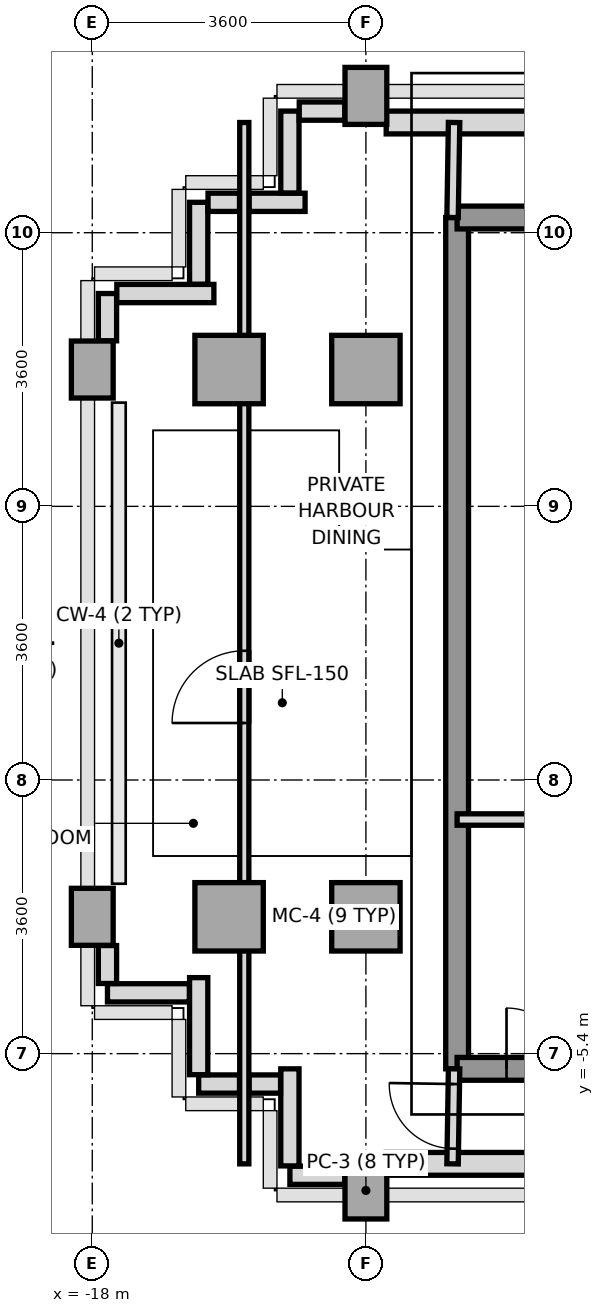
"""IFC4 building model, lengths in metres.
Left out: names, types, materials, properties, quantities, classifications, styles, units other than length and angle.
Written with IfcOpenShell. Run it as: python <this file> out.ifc"""

import sys

from ifc_helpers import new_model, si_unit, direction, frame, frame_2d, origin, origin_2d, place, context, subcontext, project, spatial, rectangle, extrude, source, transform, mapped, element, fill, save


model = new_model("IFC4")
c1 = context("Model", 3, precision=1e-05, world=origin(), true_north=direction((0.0, 1.0)))
c2 = subcontext(c1, "Body", "Model", "MODEL_VIEW")
j1 = project(units=[si_unit("LENGTHUNIT", "METRE"), si_unit("PLANEANGLEUNIT", "RADIAN")], contexts=[c1])
p1 = place(None, origin())
s1 = spatial("IfcSite", under=j1, at=p1, CompositionType="ELEMENT")
p2 = place(p1, origin())
s2 = spatial("IfcBuilding", under=s1, at=p2, CompositionType="ELEMENT")
p3 = place(p2, frame((0.0, 0.0, 242.8)))
s3 = spatial("IfcBuildingStorey", under=s2, at=p3, CompositionType="ELEMENT", Elevation=242.8)
m1 = source(origin(), c2, "Body", "SweptSolid", [
    extrude(rectangle(XDim=0.55, YDim=0.75, at=origin_2d()), origin(), (0.0, 0.0, 1.0), 3.01),
])
for number, where, z_axis, x_axis in (
    (1, (-18.0, -3.6, 0.0), (0.0, 0.0, 1.0), (1.0, 0.0, 0.0)),
    (2, (-18.0, 3.6, 0.0), (0.0, 0.0, 1.0), (1.0, 0.0, 0.0)),
):
    element("IfcColumn", number, at=place(p3, frame(where, z_axis=z_axis, x_axis=x_axis)), inside=s3, PredefinedType="COLUMN", context=c2, shape_type="MappedRepresentation", body=[
        mapped(m1, transform((0.0, 0.0, 0.0), x_axis=(1.0, 0.0, 0.0), y_axis=(0.0, 1.0, 0.0), z_axis=(0.0, 0.0, 1.0), scale=1.0)),
    ])
m2 = source(origin(), c2, "Body", "SweptSolid", [
    extrude(rectangle(XDim=0.9, YDim=0.9, at=origin_2d()), origin(), (0.0, 0.0, 1.0), 3.01),
])
for number, where, z_axis, x_axis in (
    (3, (-16.2, -3.6, 0.0), (0.0, 0.0, 1.0), (1.0, 0.0, 0.0)),
    (4, (-16.2, 3.6, 0.0), (0.0, 0.0, 1.0), (1.0, 0.0, 0.0)),
):
    element("IfcColumn", number, at=place(p3, frame(where, z_axis=z_axis, x_axis=x_axis)), inside=s3, PredefinedType="COLUMN", context=c2, shape_type="MappedRepresentation", body=[
        mapped(m2, transform((0.0, 0.0, 0.0), x_axis=(1.0, 0.0, 0.0), y_axis=(0.0, 1.0, 0.0), z_axis=(0.0, 0.0, 1.0), scale=1.0)),
    ])
p4 = place(p3, frame((-14.4, -7.2, 0.0), z_axis=(0.0, 0.0, 1.0), x_axis=(1.0, 0.0, 0.0)))
e5 = element("IfcColumn", 5, at=p4, inside=s3, PredefinedType="COLUMN", context=c2, shape_type="MappedRepresentation", body=[
    mapped(m1, transform((0.0, 0.0, 0.0), x_axis=(1.0, 0.0, 0.0), y_axis=(0.0, 1.0, 0.0), z_axis=(0.0, 0.0, 1.0), scale=1.0)),
])
for number, where, z_axis, x_axis in (
    (6, (-14.4, -3.6, 0.0), (0.0, 0.0, 1.0), (1.0, 0.0, 0.0)),
    (7, (-14.4, 3.6, 0.0), (0.0, 0.0, 1.0), (1.0, 0.0, 0.0)),
):
    element("IfcColumn", number, at=place(p3, frame(where, z_axis=z_axis, x_axis=x_axis)), inside=s3, PredefinedType="COLUMN", context=c2, shape_type="MappedRepresentation", body=[
        mapped(m2, transform((0.0, 0.0, 0.0), x_axis=(1.0, 0.0, 0.0), y_axis=(0.0, 1.0, 0.0), z_axis=(0.0, 0.0, 1.0), scale=1.0)),
    ])
p5 = place(p3, frame((-14.4, 7.2, 0.0), z_axis=(0.0, 0.0, 1.0), x_axis=(1.0, 0.0, 0.0)))
e8 = element("IfcColumn", 8, at=p5, inside=s3, PredefinedType="COLUMN", context=c2, shape_type="MappedRepresentation", body=[
    mapped(m1, transform((0.0, 0.0, 0.0), x_axis=(1.0, 0.0, 0.0), y_axis=(0.0, 1.0, 0.0), z_axis=(0.0, 0.0, 1.0), scale=1.0)),
])
p6 = place(p3, frame((-14.133, 6.85, 0.0), z_axis=(0.0, 0.0, 1.0), x_axis=(1.0, 0.0, 0.0)))
e9 = element("IfcWall", 9, at=p6, inside=s3, PredefinedType="SOLIDWALL", context=c2, shape_type="SweptSolid", body=[
    extrude(rectangle(XDim=2.685, YDim=0.3, at=frame_2d((1.343, 0.0))), origin(), (0.0, 0.0, 1.0), 2.57),
])
p7 = place(p3, frame((-14.133, -6.85, 0.0), z_axis=(0.0, 0.0, 1.0), x_axis=(1.0, 0.0, 0.0)))
e10 = element("IfcWall", 10, at=p7, inside=s3, PredefinedType="SOLIDWALL", context=c2, shape_type="SweptSolid", body=[
    extrude(rectangle(XDim=2.383, YDim=0.3, at=frame_2d((1.191, 0.0))), origin(), (0.0, 0.0, 1.0), 2.57),
])
p8 = place(p3, frame((-14.678, -7.0, 0.0), z_axis=(0.0, 0.0, 1.0), x_axis=(-1.0, 0.0, 0.0)))
e11 = element("IfcWall", 11, at=p8, inside=s3, PredefinedType="PARAPET", context=c2, shape_type="SweptSolid", body=[
    extrude(rectangle(XDim=0.722, YDim=0.24, at=frame_2d((0.361, 0.0))), origin(), (0.0, 0.0, 1.0), 1.15),
])
p9 = place(p3, frame((-15.4, -6.877, 0.0), z_axis=(0.0, 0.0, 1.0), x_axis=(0.0, 1.0, 0.0)))
e12 = element("IfcWall", 12, at=p9, inside=s3, PredefinedType="PARAPET", context=c2, shape_type="SweptSolid", body=[
    extrude(rectangle(XDim=1.277, YDim=0.24, at=frame_2d((0.638, 0.0))), origin(), (0.0, 0.0, 1.0), 1.15),
])
p10 = place(p3, frame((-15.523, -5.8, 0.0), z_axis=(0.0, 0.0, 1.0), x_axis=(-1.0, 0.0, 0.0)))
e13 = element("IfcWall", 13, at=p10, inside=s3, PredefinedType="PARAPET", context=c2, shape_type="SweptSolid", body=[
    extrude(rectangle(XDim=0.414, YDim=0.24, at=frame_2d((0.207, 0.0))), origin(), (0.0, 0.0, 1.0), 1.15),
])
p11 = place(p3, frame((-16.063, -5.8, 0.0), z_axis=(0.0, 0.0, 1.0), x_axis=(-1.0, 0.0, 0.0)))
e14 = element("IfcWall", 14, at=p11, inside=s3, PredefinedType="PARAPET", context=c2, shape_type="SweptSolid", body=[
    extrude(rectangle(XDim=0.537, YDim=0.24, at=frame_2d((0.269, 0.0))), origin(), (0.0, 0.0, 1.0), 1.15),
])
p12 = place(p3, frame((-16.6, -5.677, 0.0), z_axis=(0.0, 0.0, 1.0), x_axis=(0.0, 1.0, 0.0)))
e15 = element("IfcWall", 15, at=p12, inside=s3, PredefinedType="PARAPET", context=c2, shape_type="SweptSolid", body=[
    extrude(rectangle(XDim=1.277, YDim=0.24, at=frame_2d((0.639, 0.0))), origin(), (0.0, 0.0, 1.0), 1.15),
])
p13 = place(p3, frame((-16.723, -4.6, 0.0), z_axis=(0.0, 0.0, 1.0), x_axis=(-1.0, 0.0, 0.0)))
e16 = element("IfcWall", 16, at=p13, inside=s3, PredefinedType="PARAPET", context=c2, shape_type="SweptSolid", body=[
    extrude(rectangle(XDim=1.077, YDim=0.24, at=frame_2d((0.539, 0.0))), origin(), (0.0, 0.0, 1.0), 1.15),
])
p14 = place(p3, frame((-17.8, -4.477, 0.0), z_axis=(0.0, 0.0, 1.0), x_axis=(0.0, 1.0, 0.0)))
e17 = element("IfcWall", 17, at=p14, inside=s3, PredefinedType="PARAPET", context=c2, shape_type="SweptSolid", body=[
    extrude(rectangle(XDim=0.499, YDim=0.24, at=frame_2d((0.25, 0.0))), origin(), (0.0, 0.0, 1.0), 1.15),
])
p15 = place(p3, frame((-17.8, 3.978, 0.0), z_axis=(0.0, 0.0, 1.0), x_axis=(0.0, 1.0, 0.0)))
e18 = element("IfcWall", 18, at=p15, inside=s3, PredefinedType="PARAPET", context=c2, shape_type="SweptSolid", body=[
    extrude(rectangle(XDim=0.622, YDim=0.24, at=frame_2d((0.311, 0.0))), origin(), (0.0, 0.0, 1.0), 1.15),
])
p16 = place(p3, frame((-17.677, 4.6, 0.0), z_axis=(0.0, 0.0, 1.0), x_axis=(1.0, 0.0, 0.0)))
e19 = element("IfcWall", 19, at=p16, inside=s3, PredefinedType="PARAPET", context=c2, shape_type="SweptSolid", body=[
    extrude(rectangle(XDim=1.277, YDim=0.24, at=frame_2d((0.639, 0.0))), origin(), (0.0, 0.0, 1.0), 1.15),
])
p17 = place(p3, frame((-16.6, 4.723, 0.0), z_axis=(0.0, 0.0, 1.0), x_axis=(0.0, 1.0, 0.0)))
e20 = element("IfcWall", 20, at=p17, inside=s3, PredefinedType="PARAPET", context=c2, shape_type="SweptSolid", body=[
    extrude(rectangle(XDim=1.077, YDim=0.24, at=frame_2d((0.539, 0.0))), origin(), (0.0, 0.0, 1.0), 1.15),
])
p18 = place(p3, frame((-16.477, 5.8, 0.0), z_axis=(0.0, 0.0, 1.0), x_axis=(1.0, 0.0, 0.0)))
e21 = element("IfcWall", 21, at=p18, inside=s3, PredefinedType="PARAPET", context=c2, shape_type="SweptSolid", body=[
    extrude(rectangle(XDim=0.414, YDim=0.24, at=frame_2d((0.207, 0.0))), origin(), (0.0, 0.0, 1.0), 1.15),
])
p19 = place(p3, frame((-15.937, 5.8, 0.0), z_axis=(0.0, 0.0, 1.0), x_axis=(1.0, 0.0, 0.0)))
e22 = element("IfcWall", 22, at=p19, inside=s3, PredefinedType="PARAPET", context=c2, shape_type="SweptSolid", body=[
    extrude(rectangle(XDim=0.737, YDim=0.24, at=frame_2d((0.369, 0.0))), origin(), (0.0, 0.0, 1.0), 1.15),
])
p20 = place(p3, frame((-15.4, 5.923, 0.0), z_axis=(0.0, 0.0, 1.0), x_axis=(0.0, 1.0, 0.0)))
e23 = element("IfcWall", 23, at=p20, inside=s3, PredefinedType="PARAPET", context=c2, shape_type="SweptSolid", body=[
    extrude(rectangle(XDim=1.077, YDim=0.24, at=frame_2d((0.539, 0.0))), origin(), (0.0, 0.0, 1.0), 1.15),
])
p21 = place(p3, frame((-15.277, 7.0, 0.0), z_axis=(0.0, 0.0, 1.0), x_axis=(1.0, 0.0, 0.0)))
e24 = element("IfcWall", 24, at=p21, inside=s3, PredefinedType="PARAPET", context=c2, shape_type="SweptSolid", body=[
    extrude(rectangle(XDim=0.599, YDim=0.24, at=frame_2d((0.3, 0.0))), origin(), (0.0, 0.0, 1.0), 1.15),
])
p22 = place(p3, frame((-13.2, -5.6, 0.0), z_axis=(0.0, 0.0, 1.0), x_axis=(0.0, 1.0, 0.0)))
e25 = element("IfcWall", 25, at=p22, inside=s3, PredefinedType="SHEAR", context=c2, shape_type="SweptSolid", body=[
    extrude(rectangle(XDim=11.2, YDim=0.3, at=frame_2d((5.6, 0.0))), origin(), (0.0, 0.0, 1.0), 3.01),
])
p23 = place(p3, frame((-13.2, 5.6, 0.0), z_axis=(0.0, 0.0, 1.0), x_axis=(1.0, 0.0, 0.0)))
e26 = element("IfcWall", 26, at=p23, inside=s3, PredefinedType="SHEAR", context=c2, shape_type="SweptSolid", body=[
    extrude(rectangle(XDim=1.844, YDim=0.3, at=frame_2d((0.922, 0.0))), origin(), (0.0, 0.0, 1.0), 3.01),
])
p24 = place(p3, frame((-13.2, -5.6, 0.0), z_axis=(0.0, 0.0, 1.0), x_axis=(1.0, 0.0, 0.0)))
e27 = element("IfcWall", 27, at=p24, inside=s3, PredefinedType="SHEAR", context=c2, shape_type="SweptSolid", body=[
    extrude(rectangle(XDim=7.8, YDim=0.3, at=frame_2d((3.9, 0.0))), origin(), (0.0, 0.0, 1.0), 3.01),
])
p25 = place(p24, frame((0.65, 0.0, 0.0)))
e28 = element("IfcOpeningElement", 28, at=p25, cuts=e27, PredefinedType="OPENING", context=c2, shape_type="SweptSolid", body=[
    extrude(rectangle(XDim=0.8, YDim=2.1, at=frame_2d((0.4, 1.05))), frame((0.0, 0.16, 0.0), z_axis=(0.0, -1.0, 0.0), x_axis=(1.0, 0.0, 0.0)), (0.0, 0.0, 1.0), 0.32),
])
p26 = place(p24, frame((4.2, 0.0, 0.0)))
e29 = element("IfcOpeningElement", 29, at=p26, cuts=e27, PredefinedType="OPENING", context=c2, shape_type="SweptSolid", body=[
    extrude(rectangle(XDim=0.95, YDim=2.15, at=frame_2d((0.475, 1.075))), frame((0.0, 0.16, 0.0), z_axis=(0.0, -1.0, 0.0), x_axis=(1.0, 0.0, 0.0)), (0.0, 0.0, 1.0), 0.32),
])
p27 = place(p3, frame((-13.2, -2.32, 0.0), z_axis=(0.0, 0.0, 1.0), x_axis=(1.0, 0.0, 0.0)))
e30 = element("IfcWall", 30, at=p27, inside=s3, PredefinedType="PARTITIONING", context=c2, shape_type="SweptSolid", body=[
    extrude(rectangle(XDim=2.18, YDim=0.15, at=frame_2d((1.09, 0.0))), origin(), (0.0, 0.0, 1.0), 3.01),
])
p28 = place(p3, frame((-13.26, 5.6, 0.0), z_axis=(0.0, 0.0, 1.0), x_axis=(0.016013571389, 0.999871774545, 0.0)))
e31 = element("IfcWall", 31, at=p28, inside=s3, PredefinedType="PARTITIONING", context=c2, shape_type="SweptSolid", body=[
    extrude(rectangle(XDim=1.25, YDim=0.15, at=frame_2d((0.625, 0.0))), origin(), (0.0, 0.0, 1.0), 3.01),
])
p29 = place(p3, frame((-13.26, -6.85, 0.0), z_axis=(0.0, 0.0, 1.0), x_axis=(0.016013571389, 0.999871774545, 0.0)))
e32 = element("IfcWall", 32, at=p29, inside=s3, PredefinedType="PARTITIONING", context=c2, shape_type="SweptSolid", body=[
    extrude(rectangle(XDim=1.25, YDim=0.15, at=frame_2d((0.625, 0.0))), origin(), (0.0, 0.0, 1.0), 3.01),
])
p30 = place(p29, frame((0.2, 0.0, 0.0)))
e33 = element("IfcOpeningElement", 33, at=p30, cuts=e32, PredefinedType="OPENING", context=c2, shape_type="SweptSolid", body=[
    extrude(rectangle(XDim=0.85, YDim=2.1, at=frame_2d((0.425, 1.05))), frame((0.0, 0.085, 0.0), z_axis=(0.0, -1.0, 0.0), x_axis=(1.0, 0.0, 0.0)), (0.0, 0.0, 1.0), 0.17),
])
p31 = place(p3, frame((-16.0, -6.85, 0.0), z_axis=(0.0, 0.0, 1.0), x_axis=(0.0, 1.0, 0.0)))
e34 = element("IfcWall", 34, at=p31, inside=s3, PredefinedType="PARTITIONING", context=c2, shape_type="SweptSolid", body=[
    extrude(rectangle(XDim=13.7, YDim=0.12, at=frame_2d((6.85, 0.0))), origin(), (0.0, 0.0, 1.0), 3.01),
])
p32 = place(p31, frame((5.8, 0.0, 0.0)))
e35 = element("IfcOpeningElement", 35, at=p32, cuts=e34, PredefinedType="OPENING", context=c2, shape_type="SweptSolid", body=[
    extrude(rectangle(XDim=0.95, YDim=2.15, at=frame_2d((0.475, 1.075))), frame((0.0, 0.07, 0.0), z_axis=(0.0, -1.0, 0.0), x_axis=(1.0, 0.0, 0.0)), (0.0, 0.0, 1.0), 0.14),
])
m3 = source(origin(), c2, "Body", "SweptSolid", [
    extrude(rectangle(XDim=0.8, YDim=2.1, at=frame_2d((0.4, 1.05))), frame((0.0, 0.025, 0.0), z_axis=(0.0, -1.0, 0.0), x_axis=(1.0, 0.0, 0.0)), (0.0, 0.0, 1.0), 0.05),
])
p33 = place(p25, origin())
e36 = element("IfcDoor", 36, at=p33, inside=s3, OperationType="SINGLE_SWING_LEFT", PredefinedType="DOOR", context=c2, shape_type="MappedRepresentation", body=[
    mapped(m3, transform((0.0, 0.0, 0.0), x_axis=(1.0, 0.0, 0.0), y_axis=(0.0, 1.0, 0.0), z_axis=(0.0, 0.0, 1.0), scale=1.0)),
])
fill(e28, e36)
m4 = source(origin(), c2, "Body", "SweptSolid", [
    extrude(rectangle(XDim=0.85, YDim=2.1, at=frame_2d((0.425, 1.05))), frame((0.0, 0.025, 0.0), z_axis=(0.0, -1.0, 0.0), x_axis=(1.0, 0.0, 0.0)), (0.0, 0.0, 1.0), 0.05),
])
p34 = place(p30, origin())
e37 = element("IfcDoor", 37, at=p34, inside=s3, OperationType="SINGLE_SWING_RIGHT", PredefinedType="DOOR", context=c2, shape_type="MappedRepresentation", body=[
    mapped(m4, transform((0.0, 0.0, 0.0), x_axis=(1.0, 0.0, 0.0), y_axis=(0.0, 1.0, 0.0), z_axis=(0.0, 0.0, 1.0), scale=1.0)),
])
fill(e33, e37)
m5 = source(origin(), c2, "Body", "SweptSolid", [
    extrude(rectangle(XDim=0.95, YDim=2.15, at=frame_2d((0.475, 1.075))), frame((0.0, 0.025, 0.0), z_axis=(0.0, -1.0, 0.0), x_axis=(1.0, 0.0, 0.0)), (0.0, 0.0, 1.0), 0.05),
])
p35 = place(p32, origin())
e38 = element("IfcDoor", 38, at=p35, inside=s3, OperationType="SINGLE_SWING_LEFT", PredefinedType="DOOR", context=c2, shape_type="MappedRepresentation", body=[
    mapped(m5, transform((0.0, 0.0, 0.0), x_axis=(1.0, 0.0, 0.0), y_axis=(0.0, 1.0, 0.0), z_axis=(0.0, 0.0, 1.0), scale=1.0)),
])
fill(e35, e38)
save(model, sys.argv[1])
